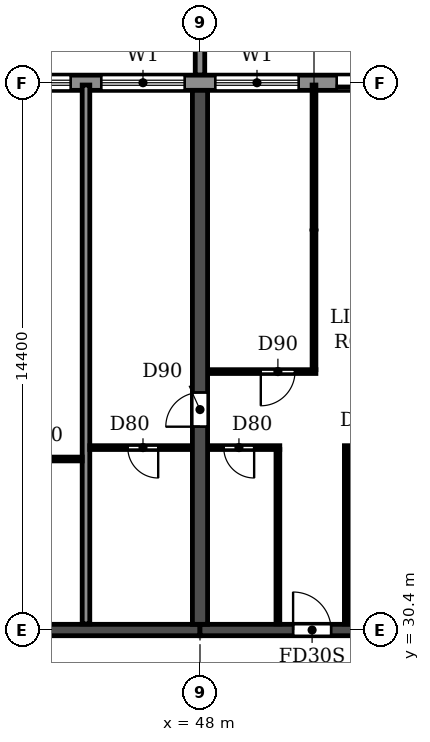
"""IFC4 building model, lengths in metres.
Left out: names, types, materials, properties, quantities, classifications, styles, units other than length and angle.
Written with IfcOpenShell. Run it as: python <this file> out.ifc"""

import sys

from ifc_helpers import new_model, si_unit, direction, frame, frame_2d, origin, place, context, subcontext, project, spatial, polyline, rectangle, outline, extrude, source, transform, mapped, element, fill, save


model = new_model("IFC4")
c1 = context("Model", 3, precision=1e-05, world=origin(), true_north=direction((0.0, 1.0)))
c2 = subcontext(c1, "Body", "Model", "MODEL_VIEW")
j1 = project(units=[si_unit("LENGTHUNIT", "METRE"), si_unit("PLANEANGLEUNIT", "RADIAN")], contexts=[c1])
p1 = place(None, origin())
s1 = spatial("IfcSite", under=j1, at=p1, CompositionType="ELEMENT")
p2 = place(p1, origin())
s2 = spatial("IfcBuilding", under=s1, at=p2, CompositionType="ELEMENT")
p3 = place(p2, frame((0.0, 0.0, 33.3)))
s3 = spatial("IfcBuildingStorey", under=s2, at=p3, CompositionType="ELEMENT", Elevation=33.3)
p4 = place(p3, frame((48.0, 30.55, 0.0), z_axis=(0.0, 0.0, 1.0), x_axis=(0.0, 1.0, 0.0)))
e1 = element("IfcWall", 1, at=p4, inside=s3, PredefinedType="SHEAR", context=c2, shape_type="SweptSolid", body=[
    extrude(rectangle(XDim=14.05, YDim=0.4, at=frame_2d((7.025, 0.0))), origin(), (0.0, 0.0, 1.0), 3.05),
])
p5 = place(p4, frame((5.2, 0.0, 0.0)))
e2 = element("IfcOpeningElement", 2, at=p5, cuts=e1, PredefinedType="OPENING", context=c2, shape_type="SweptSolid", body=[
    extrude(rectangle(XDim=0.9, YDim=2.1, at=frame_2d((0.45, 1.05))), frame((0.0, 0.21, 0.0), z_axis=(0.0, -1.0, 0.0), x_axis=(1.0, 0.0, 0.0)), (0.0, 0.0, 1.0), 0.42),
])
p6 = place(p3, frame((42.0, 30.4, 0.0), z_axis=(0.0, 0.0, 1.0), x_axis=(1.0, 0.0, 0.0)))
e3 = element("IfcWall", 3, at=p6, inside=s3, PredefinedType="SHEAR", context=c2, shape_type="SweptSolid", body=[
    extrude(rectangle(XDim=6.0, YDim=0.3, at=frame_2d((3.0, 0.0))), origin(), (0.0, 0.0, 1.0), 2.45),
])
p7 = place(p3, frame((48.0, 30.4, 0.0), z_axis=(0.0, 0.0, 1.0), x_axis=(1.0, 0.0, 0.0)))
e4 = element("IfcWall", 4, at=p7, inside=s3, PredefinedType="SHEAR", context=c2, shape_type="SweptSolid", body=[
    extrude(rectangle(XDim=6.0, YDim=0.3, at=frame_2d((3.0, 0.0))), origin(), (0.0, 0.0, 1.0), 2.45),
])
p8 = place(p7, frame((2.45, 0.0, 0.0)))
e5 = element("IfcOpeningElement", 5, at=p8, cuts=e4, PredefinedType="OPENING", context=c2, shape_type="SweptSolid", body=[
    extrude(rectangle(XDim=1.0, YDim=2.1, at=frame_2d((0.5, 1.05))), frame((0.0, 0.16, 0.0), z_axis=(0.0, -1.0, 0.0), x_axis=(1.0, 0.0, 0.0)), (0.0, 0.0, 1.0), 0.32),
])
p9 = place(p3, frame((97.317, 44.8, 0.0), z_axis=(0.0, 0.0, 1.0), x_axis=(-1.0, 0.0, 0.0)))
e6 = element("IfcWall", 6, at=p9, inside=s3, PredefinedType="STANDARD", context=c2, shape_type="SweptSolid", body=[
    extrude(rectangle(XDim=92.634, YDim=0.4, at=frame_2d((46.317, 0.0))), origin(), (0.0, 0.0, 1.0), 3.05),
])
p10 = place(p9, frame((88.717, 0.0, 0.9)))
e7 = element("IfcOpeningElement", 7, at=p10, cuts=e6, PredefinedType="OPENING", context=c2, shape_type="SweptSolid", body=[
    extrude(rectangle(XDim=2.2, YDim=1.5, at=frame_2d((1.1, 0.75))), frame((0.0, 0.21, 0.0), z_axis=(0.0, -1.0, 0.0), x_axis=(1.0, 0.0, 0.0)), (0.0, 0.0, 1.0), 0.42),
])
p11 = place(p9, frame((85.917, 0.0, 0.0)))
e8 = element("IfcOpeningElement", 8, at=p11, cuts=e6, PredefinedType="OPENING", context=c2, shape_type="SweptSolid", body=[
    extrude(rectangle(XDim=1.8, YDim=2.4, at=frame_2d((0.9, 1.2))), frame((0.0, 0.21, 0.0), z_axis=(0.0, -1.0, 0.0), x_axis=(1.0, 0.0, 0.0)), (0.0, 0.0, 1.0), 0.42),
])
p12 = place(p9, frame((82.717, 0.0, 0.9)))
e9 = element("IfcOpeningElement", 9, at=p12, cuts=e6, PredefinedType="OPENING", context=c2, shape_type="SweptSolid", body=[
    extrude(rectangle(XDim=2.2, YDim=1.5, at=frame_2d((1.1, 0.75))), frame((0.0, 0.21, 0.0), z_axis=(0.0, -1.0, 0.0), x_axis=(1.0, 0.0, 0.0)), (0.0, 0.0, 1.0), 0.42),
])
p13 = place(p9, frame((79.917, 0.0, 0.0)))
e10 = element("IfcOpeningElement", 10, at=p13, cuts=e6, PredefinedType="OPENING", context=c2, shape_type="SweptSolid", body=[
    extrude(rectangle(XDim=1.8, YDim=2.4, at=frame_2d((0.9, 1.2))), frame((0.0, 0.21, 0.0), z_axis=(0.0, -1.0, 0.0), x_axis=(1.0, 0.0, 0.0)), (0.0, 0.0, 1.0), 0.42),
])
p14 = place(p9, frame((76.717, 0.0, 0.9)))
e11 = element("IfcOpeningElement", 11, at=p14, cuts=e6, PredefinedType="OPENING", context=c2, shape_type="SweptSolid", body=[
    extrude(rectangle(XDim=2.2, YDim=1.5, at=frame_2d((1.1, 0.75))), frame((0.0, 0.21, 0.0), z_axis=(0.0, -1.0, 0.0), x_axis=(1.0, 0.0, 0.0)), (0.0, 0.0, 1.0), 0.42),
])
p15 = place(p9, frame((73.717, 0.0, 0.9)))
e12 = element("IfcOpeningElement", 12, at=p15, cuts=e6, PredefinedType="OPENING", context=c2, shape_type="SweptSolid", body=[
    extrude(rectangle(XDim=2.2, YDim=1.5, at=frame_2d((1.1, 0.75))), frame((0.0, 0.21, 0.0), z_axis=(0.0, -1.0, 0.0), x_axis=(1.0, 0.0, 0.0)), (0.0, 0.0, 1.0), 0.42),
])
p16 = place(p9, frame((70.717, 0.0, 0.9)))
e13 = element("IfcOpeningElement", 13, at=p16, cuts=e6, PredefinedType="OPENING", context=c2, shape_type="SweptSolid", body=[
    extrude(rectangle(XDim=2.2, YDim=1.5, at=frame_2d((1.1, 0.75))), frame((0.0, 0.21, 0.0), z_axis=(0.0, -1.0, 0.0), x_axis=(1.0, 0.0, 0.0)), (0.0, 0.0, 1.0), 0.42),
])
p17 = place(p9, frame((67.917, 0.0, 0.0)))
e14 = element("IfcOpeningElement", 14, at=p17, cuts=e6, PredefinedType="OPENING", context=c2, shape_type="SweptSolid", body=[
    extrude(rectangle(XDim=1.8, YDim=2.4, at=frame_2d((0.9, 1.2))), frame((0.0, 0.21, 0.0), z_axis=(0.0, -1.0, 0.0), x_axis=(1.0, 0.0, 0.0)), (0.0, 0.0, 1.0), 0.42),
])
p18 = place(p9, frame((64.717, 0.0, 0.9)))
e15 = element("IfcOpeningElement", 15, at=p18, cuts=e6, PredefinedType="OPENING", context=c2, shape_type="SweptSolid", body=[
    extrude(rectangle(XDim=2.2, YDim=1.5, at=frame_2d((1.1, 0.75))), frame((0.0, 0.21, 0.0), z_axis=(0.0, -1.0, 0.0), x_axis=(1.0, 0.0, 0.0)), (0.0, 0.0, 1.0), 0.42),
])
p19 = place(p9, frame((61.717, 0.0, 0.9)))
e16 = element("IfcOpeningElement", 16, at=p19, cuts=e6, PredefinedType="OPENING", context=c2, shape_type="SweptSolid", body=[
    extrude(rectangle(XDim=2.2, YDim=1.5, at=frame_2d((1.1, 0.75))), frame((0.0, 0.21, 0.0), z_axis=(0.0, -1.0, 0.0), x_axis=(1.0, 0.0, 0.0)), (0.0, 0.0, 1.0), 0.42),
])
p20 = place(p9, frame((58.717, 0.0, 0.9)))
e17 = element("IfcOpeningElement", 17, at=p20, cuts=e6, PredefinedType="OPENING", context=c2, shape_type="SweptSolid", body=[
    extrude(rectangle(XDim=2.2, YDim=1.5, at=frame_2d((1.1, 0.75))), frame((0.0, 0.21, 0.0), z_axis=(0.0, -1.0, 0.0), x_axis=(1.0, 0.0, 0.0)), (0.0, 0.0, 1.0), 0.42),
])
p21 = place(p9, frame((55.917, 0.0, 0.0)))
e18 = element("IfcOpeningElement", 18, at=p21, cuts=e6, PredefinedType="OPENING", context=c2, shape_type="SweptSolid", body=[
    extrude(rectangle(XDim=1.8, YDim=2.4, at=frame_2d((0.9, 1.2))), frame((0.0, 0.21, 0.0), z_axis=(0.0, -1.0, 0.0), x_axis=(1.0, 0.0, 0.0)), (0.0, 0.0, 1.0), 0.42),
])
p22 = place(p9, frame((52.717, 0.0, 0.9)))
e19 = element("IfcOpeningElement", 19, at=p22, cuts=e6, PredefinedType="OPENING", context=c2, shape_type="SweptSolid", body=[
    extrude(rectangle(XDim=2.2, YDim=1.5, at=frame_2d((1.1, 0.75))), frame((0.0, 0.21, 0.0), z_axis=(0.0, -1.0, 0.0), x_axis=(1.0, 0.0, 0.0)), (0.0, 0.0, 1.0), 0.42),
])
p23 = place(p9, frame((49.717, 0.0, 0.9)))
e20 = element("IfcOpeningElement", 20, at=p23, cuts=e6, PredefinedType="OPENING", context=c2, shape_type="SweptSolid", body=[
    extrude(rectangle(XDim=2.2, YDim=1.5, at=frame_2d((1.1, 0.75))), frame((0.0, 0.21, 0.0), z_axis=(0.0, -1.0, 0.0), x_axis=(1.0, 0.0, 0.0)), (0.0, 0.0, 1.0), 0.42),
])
p24 = place(p9, frame((46.717, 0.0, 0.9)))
e21 = element("IfcOpeningElement", 21, at=p24, cuts=e6, PredefinedType="OPENING", context=c2, shape_type="SweptSolid", body=[
    extrude(rectangle(XDim=2.2, YDim=1.5, at=frame_2d((1.1, 0.75))), frame((0.0, 0.21, 0.0), z_axis=(0.0, -1.0, 0.0), x_axis=(1.0, 0.0, 0.0)), (0.0, 0.0, 1.0), 0.42),
])
p25 = place(p9, frame((43.917, 0.0, 0.0)))
e22 = element("IfcOpeningElement", 22, at=p25, cuts=e6, PredefinedType="OPENING", context=c2, shape_type="SweptSolid", body=[
    extrude(rectangle(XDim=1.8, YDim=2.4, at=frame_2d((0.9, 1.2))), frame((0.0, 0.21, 0.0), z_axis=(0.0, -1.0, 0.0), x_axis=(1.0, 0.0, 0.0)), (0.0, 0.0, 1.0), 0.42),
])
p26 = place(p9, frame((40.717, 0.0, 0.9)))
e23 = element("IfcOpeningElement", 23, at=p26, cuts=e6, PredefinedType="OPENING", context=c2, shape_type="SweptSolid", body=[
    extrude(rectangle(XDim=2.2, YDim=1.5, at=frame_2d((1.1, 0.75))), frame((0.0, 0.21, 0.0), z_axis=(0.0, -1.0, 0.0), x_axis=(1.0, 0.0, 0.0)), (0.0, 0.0, 1.0), 0.42),
])
p27 = place(p9, frame((37.717, 0.0, 0.9)))
e24 = element("IfcOpeningElement", 24, at=p27, cuts=e6, PredefinedType="OPENING", context=c2, shape_type="SweptSolid", body=[
    extrude(rectangle(XDim=2.2, YDim=1.5, at=frame_2d((1.1, 0.75))), frame((0.0, 0.21, 0.0), z_axis=(0.0, -1.0, 0.0), x_axis=(1.0, 0.0, 0.0)), (0.0, 0.0, 1.0), 0.42),
])
p28 = place(p9, frame((34.717, 0.0, 0.9)))
e25 = element("IfcOpeningElement", 25, at=p28, cuts=e6, PredefinedType="OPENING", context=c2, shape_type="SweptSolid", body=[
    extrude(rectangle(XDim=2.2, YDim=1.5, at=frame_2d((1.1, 0.75))), frame((0.0, 0.21, 0.0), z_axis=(0.0, -1.0, 0.0), x_axis=(1.0, 0.0, 0.0)), (0.0, 0.0, 1.0), 0.42),
])
p29 = place(p9, frame((31.917, 0.0, 0.0)))
e26 = element("IfcOpeningElement", 26, at=p29, cuts=e6, PredefinedType="OPENING", context=c2, shape_type="SweptSolid", body=[
    extrude(rectangle(XDim=1.8, YDim=2.4, at=frame_2d((0.9, 1.2))), frame((0.0, 0.21, 0.0), z_axis=(0.0, -1.0, 0.0), x_axis=(1.0, 0.0, 0.0)), (0.0, 0.0, 1.0), 0.42),
])
p30 = place(p9, frame((28.717, 0.0, 0.9)))
e27 = element("IfcOpeningElement", 27, at=p30, cuts=e6, PredefinedType="OPENING", context=c2, shape_type="SweptSolid", body=[
    extrude(rectangle(XDim=2.2, YDim=1.5, at=frame_2d((1.1, 0.75))), frame((0.0, 0.21, 0.0), z_axis=(0.0, -1.0, 0.0), x_axis=(1.0, 0.0, 0.0)), (0.0, 0.0, 1.0), 0.42),
])
p31 = place(p9, frame((25.717, 0.0, 0.9)))
e28 = element("IfcOpeningElement", 28, at=p31, cuts=e6, PredefinedType="OPENING", context=c2, shape_type="SweptSolid", body=[
    extrude(rectangle(XDim=2.2, YDim=1.5, at=frame_2d((1.1, 0.75))), frame((0.0, 0.21, 0.0), z_axis=(0.0, -1.0, 0.0), x_axis=(1.0, 0.0, 0.0)), (0.0, 0.0, 1.0), 0.42),
])
p32 = place(p9, frame((22.917, 0.0, 0.0)))
e29 = element("IfcOpeningElement", 29, at=p32, cuts=e6, PredefinedType="OPENING", context=c2, shape_type="SweptSolid", body=[
    extrude(rectangle(XDim=1.8, YDim=2.4, at=frame_2d((0.9, 1.2))), frame((0.0, 0.21, 0.0), z_axis=(0.0, -1.0, 0.0), x_axis=(1.0, 0.0, 0.0)), (0.0, 0.0, 1.0), 0.42),
])
p33 = place(p9, frame((19.717, 0.0, 0.9)))
e30 = element("IfcOpeningElement", 30, at=p33, cuts=e6, PredefinedType="OPENING", context=c2, shape_type="SweptSolid", body=[
    extrude(rectangle(XDim=2.2, YDim=1.5, at=frame_2d((1.1, 0.75))), frame((0.0, 0.21, 0.0), z_axis=(0.0, -1.0, 0.0), x_axis=(1.0, 0.0, 0.0)), (0.0, 0.0, 1.0), 0.42),
])
p34 = place(p9, frame((16.717, 0.0, 0.9)))
e31 = element("IfcOpeningElement", 31, at=p34, cuts=e6, PredefinedType="OPENING", context=c2, shape_type="SweptSolid", body=[
    extrude(rectangle(XDim=2.2, YDim=1.5, at=frame_2d((1.1, 0.75))), frame((0.0, 0.21, 0.0), z_axis=(0.0, -1.0, 0.0), x_axis=(1.0, 0.0, 0.0)), (0.0, 0.0, 1.0), 0.42),
])
p35 = place(p9, frame((13.917, 0.0, 0.0)))
e32 = element("IfcOpeningElement", 32, at=p35, cuts=e6, PredefinedType="OPENING", context=c2, shape_type="SweptSolid", body=[
    extrude(rectangle(XDim=1.8, YDim=2.4, at=frame_2d((0.9, 1.2))), frame((0.0, 0.21, 0.0), z_axis=(0.0, -1.0, 0.0), x_axis=(1.0, 0.0, 0.0)), (0.0, 0.0, 1.0), 0.42),
])
p36 = place(p9, frame((10.717, 0.0, 0.9)))
e33 = element("IfcOpeningElement", 33, at=p36, cuts=e6, PredefinedType="OPENING", context=c2, shape_type="SweptSolid", body=[
    extrude(rectangle(XDim=2.2, YDim=1.5, at=frame_2d((1.1, 0.75))), frame((0.0, 0.21, 0.0), z_axis=(0.0, -1.0, 0.0), x_axis=(1.0, 0.0, 0.0)), (0.0, 0.0, 1.0), 0.42),
])
p37 = place(p9, frame((7.917, 0.0, 0.0)))
e34 = element("IfcOpeningElement", 34, at=p37, cuts=e6, PredefinedType="OPENING", context=c2, shape_type="SweptSolid", body=[
    extrude(rectangle(XDim=1.8, YDim=2.4, at=frame_2d((0.9, 1.2))), frame((0.0, 0.21, 0.0), z_axis=(0.0, -1.0, 0.0), x_axis=(1.0, 0.0, 0.0)), (0.0, 0.0, 1.0), 0.42),
])
p38 = place(p9, frame((4.717, 0.0, 0.9)))
e35 = element("IfcOpeningElement", 35, at=p38, cuts=e6, PredefinedType="OPENING", context=c2, shape_type="SweptSolid", body=[
    extrude(rectangle(XDim=2.2, YDim=1.5, at=frame_2d((1.1, 0.75))), frame((0.0, 0.21, 0.0), z_axis=(0.0, -1.0, 0.0), x_axis=(1.0, 0.0, 0.0)), (0.0, 0.0, 1.0), 0.42),
])
p39 = place(p9, frame((1.917, 0.0, 0.0)))
e36 = element("IfcOpeningElement", 36, at=p39, cuts=e6, PredefinedType="OPENING", context=c2, shape_type="SweptSolid", body=[
    extrude(rectangle(XDim=1.8, YDim=2.4, at=frame_2d((0.9, 1.2))), frame((0.0, 0.21, 0.0), z_axis=(0.0, -1.0, 0.0), x_axis=(1.0, 0.0, 0.0)), (0.0, 0.0, 1.0), 0.42),
])
m1 = source(origin(), c2, "Body", "SweptSolid", [
    extrude(outline(polyline([(0.0, 0.0), (0.25, 0.0), (0.25, 3.1), (0.0, 3.1), (0.0, 0.0)])), origin(), (0.0, 0.0, 1.0), 3.1),
])
p40 = place(p3, frame((47.875, 45.0, 0.0)))
e37 = element("IfcWall", 37, at=p40, inside=s3, PredefinedType="STANDARD", context=c2, shape_type="MappedRepresentation", body=[
    mapped(m1, transform((0.0, 0.0, 0.0))),
])
p41 = place(p3, frame((45.0, 30.56, 0.0), z_axis=(0.0, 0.0, 1.0), x_axis=(0.0, 1.0, 0.0)))
e38 = element("IfcWall", 38, at=p41, inside=s3, PredefinedType="PARTITIONING", context=c2, shape_type="SweptSolid", body=[
    extrude(rectangle(XDim=14.18, YDim=0.2, at=frame_2d((7.09, 0.0))), origin(), (0.0, 0.0, 1.0), 3.05),
])
p42 = place(p3, frame((42.21, 34.9, 0.0), z_axis=(0.0, 0.0, 1.0), x_axis=(1.0, 0.0, 0.0)))
e39 = element("IfcWall", 39, at=p42, inside=s3, PredefinedType="PARTITIONING", context=c2, shape_type="SweptSolid", body=[
    extrude(rectangle(XDim=2.69, YDim=0.1, at=frame_2d((1.345, 0.0))), origin(), (0.0, 0.0, 1.0), 3.05),
])
p43 = place(p42, frame((0.89, 0.0, 0.0)))
e40 = element("IfcOpeningElement", 40, at=p43, cuts=e39, PredefinedType="OPENING", context=c2, shape_type="SweptSolid", body=[
    extrude(rectangle(XDim=0.8, YDim=2.1, at=frame_2d((0.4, 1.05))), frame((0.0, 0.06, 0.0), z_axis=(0.0, -1.0, 0.0), x_axis=(1.0, 0.0, 0.0)), (0.0, 0.0, 1.0), 0.12),
])
p44 = place(p3, frame((45.1, 35.2, 0.0), z_axis=(0.0, 0.0, 1.0), x_axis=(1.0, 0.0, 0.0)))
e41 = element("IfcWall", 41, at=p44, inside=s3, PredefinedType="PARTITIONING", context=c2, shape_type="SweptSolid", body=[
    extrude(rectangle(XDim=2.69, YDim=0.1, at=frame_2d((1.345, 0.0))), origin(), (0.0, 0.0, 1.0), 3.05),
])
p45 = place(p44, frame((1.0, 0.0, 0.0)))
e42 = element("IfcOpeningElement", 42, at=p45, cuts=e41, PredefinedType="OPENING", context=c2, shape_type="SweptSolid", body=[
    extrude(rectangle(XDim=0.8, YDim=2.1, at=frame_2d((0.4, 1.05))), frame((0.0, 0.06, 0.0), z_axis=(0.0, -1.0, 0.0), x_axis=(1.0, 0.0, 0.0)), (0.0, 0.0, 1.0), 0.12),
])
p46 = place(p3, frame((48.21, 35.2, 0.0), z_axis=(0.0, 0.0, 1.0), x_axis=(1.0, 0.0, 0.0)))
e43 = element("IfcWall", 43, at=p46, inside=s3, PredefinedType="PARTITIONING", context=c2, shape_type="SweptSolid", body=[
    extrude(rectangle(XDim=1.89, YDim=0.1, at=frame_2d((0.945, 0.0))), origin(), (0.0, 0.0, 1.0), 3.05),
])
p47 = place(p46, frame((0.415, 0.0, 0.0)))
e44 = element("IfcOpeningElement", 44, at=p47, cuts=e43, PredefinedType="OPENING", context=c2, shape_type="SweptSolid", body=[
    extrude(rectangle(XDim=0.8, YDim=2.1, at=frame_2d((0.4, 1.05))), frame((0.0, 0.06, 0.0), z_axis=(0.0, -1.0, 0.0), x_axis=(1.0, 0.0, 0.0)), (0.0, 0.0, 1.0), 0.12),
])
p48 = place(p3, frame((51.8, 35.2, 0.0), z_axis=(0.0, 0.0, 1.0), x_axis=(1.0, 0.0, 0.0)))
e45 = element("IfcWall", 45, at=p48, inside=s3, PredefinedType="PARTITIONING", context=c2, shape_type="SweptSolid", body=[
    extrude(rectangle(XDim=1.99, YDim=0.1, at=frame_2d((0.995, 0.0))), origin(), (0.0, 0.0, 1.0), 3.05),
])
p49 = place(p48, frame((0.675, 0.0, 0.0)))
e46 = element("IfcOpeningElement", 46, at=p49, cuts=e45, PredefinedType="OPENING", context=c2, shape_type="SweptSolid", body=[
    extrude(rectangle(XDim=0.9, YDim=2.1, at=frame_2d((0.45, 1.05))), frame((0.0, 0.06, 0.0), z_axis=(0.0, -1.0, 0.0), x_axis=(1.0, 0.0, 0.0)), (0.0, 0.0, 1.0), 0.12),
])
p50 = place(p3, frame((48.21, 37.2, 0.0), z_axis=(0.0, 0.0, 1.0), x_axis=(1.0, 0.0, 0.0)))
e47 = element("IfcWall", 47, at=p50, inside=s3, PredefinedType="PARTITIONING", context=c2, shape_type="SweptSolid", body=[
    extrude(rectangle(XDim=2.84, YDim=0.1, at=frame_2d((1.42, 0.0))), origin(), (0.0, 0.0, 1.0), 3.05),
])
p51 = place(p50, frame((1.39, 0.0, 0.0)))
e48 = element("IfcOpeningElement", 48, at=p51, cuts=e47, PredefinedType="OPENING", context=c2, shape_type="SweptSolid", body=[
    extrude(rectangle(XDim=0.9, YDim=2.1, at=frame_2d((0.45, 1.05))), frame((0.0, 0.06, 0.0), z_axis=(0.0, -1.0, 0.0), x_axis=(1.0, 0.0, 0.0)), (0.0, 0.0, 1.0), 0.12),
])
p52 = place(p3, frame((50.05, 30.56, 0.0), z_axis=(0.0, 0.0, 1.0), x_axis=(0.0, 1.0, 0.0)))
e49 = element("IfcWall", 49, at=p52, inside=s3, PredefinedType="PARTITIONING", context=c2, shape_type="SweptSolid", body=[
    extrude(rectangle(XDim=4.59, YDim=0.1, at=frame_2d((2.295, 0.0))), origin(), (0.0, 0.0, 1.0), 3.05),
])
p53 = place(p3, frame((51.0, 37.25, 0.0), z_axis=(0.0, 0.0, 1.0), x_axis=(0.0, 1.0, 0.0)))
e50 = element("IfcWall", 50, at=p53, inside=s3, PredefinedType="PARTITIONING", context=c2, shape_type="SweptSolid", body=[
    extrude(rectangle(XDim=7.49, YDim=0.1, at=frame_2d((3.745, 0.0))), origin(), (0.0, 0.0, 1.0), 3.05),
])
p54 = place(p3, frame((51.85, 30.56, 0.0), z_axis=(0.0, 0.0, 1.0), x_axis=(0.0, 1.0, 0.0)))
e51 = element("IfcWall", 51, at=p54, inside=s3, PredefinedType="PARTITIONING", context=c2, shape_type="SweptSolid", body=[
    extrude(rectangle(XDim=4.59, YDim=0.1, at=frame_2d((2.295, 0.0))), origin(), (0.0, 0.0, 1.0), 3.05),
])
p55 = place(p22, origin())
e52 = element("IfcWindow", 52, at=p55, inside=s3, PartitioningType="DOUBLE_PANEL_HORIZONTAL", PredefinedType="WINDOW", context=c2, shape_type="SweptSolid", body=[
    extrude(rectangle(XDim=2.2, YDim=1.5, at=frame_2d((1.1, 0.75))), frame((0.0, 0.03, 0.0), z_axis=(0.0, -1.0, 0.0), x_axis=(1.0, 0.0, 0.0)), (0.0, 0.0, 1.0), 0.06),
])
fill(e19, e52)
p56 = place(p23, origin())
e53 = element("IfcWindow", 53, at=p56, inside=s3, PartitioningType="DOUBLE_PANEL_HORIZONTAL", PredefinedType="WINDOW", context=c2, shape_type="SweptSolid", body=[
    extrude(rectangle(XDim=2.2, YDim=1.5, at=frame_2d((1.1, 0.75))), frame((0.0, 0.03, 0.0), z_axis=(0.0, -1.0, 0.0), x_axis=(1.0, 0.0, 0.0)), (0.0, 0.0, 1.0), 0.06),
])
fill(e20, e53)
p57 = place(p24, origin())
e54 = element("IfcWindow", 54, at=p57, inside=s3, PartitioningType="DOUBLE_PANEL_HORIZONTAL", PredefinedType="WINDOW", context=c2, shape_type="SweptSolid", body=[
    extrude(rectangle(XDim=2.2, YDim=1.5, at=frame_2d((1.1, 0.75))), frame((0.0, 0.03, 0.0), z_axis=(0.0, -1.0, 0.0), x_axis=(1.0, 0.0, 0.0)), (0.0, 0.0, 1.0), 0.06),
])
fill(e21, e54)
p58 = place(p25, origin())
e55 = element("IfcDoor", 55, at=p58, inside=s3, OperationType="DOUBLE_DOOR_SLIDING", PredefinedType="DOOR", context=c2, shape_type="SweptSolid", body=[
    extrude(rectangle(XDim=1.8, YDim=2.4, at=frame_2d((0.9, 1.2))), frame((0.0, 0.025, 0.0), z_axis=(0.0, -1.0, 0.0), x_axis=(1.0, 0.0, 0.0)), (0.0, 0.0, 1.0), 0.05),
])
fill(e22, e55)
p59 = place(p45, frame((0.8, 0.0, 0.0), z_axis=(0.0, 0.0, 1.0), x_axis=(-1.0, 0.0, 0.0)))
e56 = element("IfcDoor", 56, at=p59, inside=s3, OperationType="SINGLE_SWING_LEFT", PredefinedType="DOOR", context=c2, shape_type="SweptSolid", body=[
    extrude(rectangle(XDim=0.8, YDim=2.1, at=frame_2d((0.4, 1.05))), frame((0.0, 0.025, 0.0), z_axis=(0.0, -1.0, 0.0), x_axis=(1.0, 0.0, 0.0)), (0.0, 0.0, 1.0), 0.05),
])
fill(e42, e56)
p60 = place(p5, origin())
e57 = element("IfcDoor", 57, at=p60, inside=s3, OperationType="SINGLE_SWING_LEFT", PredefinedType="DOOR", context=c2, shape_type="SweptSolid", body=[
    extrude(rectangle(XDim=0.9, YDim=2.1, at=frame_2d((0.45, 1.05))), frame((0.0, 0.025, 0.0), z_axis=(0.0, -1.0, 0.0), x_axis=(1.0, 0.0, 0.0)), (0.0, 0.0, 1.0), 0.05),
])
fill(e2, e57)
p61 = place(p47, frame((0.8, 0.0, 0.0), z_axis=(0.0, 0.0, 1.0), x_axis=(-1.0, 0.0, 0.0)))
e58 = element("IfcDoor", 58, at=p61, inside=s3, OperationType="SINGLE_SWING_LEFT", PredefinedType="DOOR", context=c2, shape_type="SweptSolid", body=[
    extrude(rectangle(XDim=0.8, YDim=2.1, at=frame_2d((0.4, 1.05))), frame((0.0, 0.025, 0.0), z_axis=(0.0, -1.0, 0.0), x_axis=(1.0, 0.0, 0.0)), (0.0, 0.0, 1.0), 0.05),
])
fill(e44, e58)
p62 = place(p51, frame((0.9, 0.0, 0.0), z_axis=(0.0, 0.0, 1.0), x_axis=(-1.0, 0.0, 0.0)))
e59 = element("IfcDoor", 59, at=p62, inside=s3, OperationType="SINGLE_SWING_RIGHT", PredefinedType="DOOR", context=c2, shape_type="SweptSolid", body=[
    extrude(rectangle(XDim=0.9, YDim=2.1, at=frame_2d((0.45, 1.05))), frame((0.0, 0.025, 0.0), z_axis=(0.0, -1.0, 0.0), x_axis=(1.0, 0.0, 0.0)), (0.0, 0.0, 1.0), 0.05),
])
fill(e48, e59)
p63 = place(p8, origin())
e60 = element("IfcDoor", 60, at=p63, inside=s3, OperationType="SINGLE_SWING_LEFT", PredefinedType="DOOR", context=c2, shape_type="SweptSolid", body=[
    extrude(rectangle(XDim=1.0, YDim=2.1, at=frame_2d((0.5, 1.05))), frame((0.0, 0.025, 0.0), z_axis=(0.0, -1.0, 0.0), x_axis=(1.0, 0.0, 0.0)), (0.0, 0.0, 1.0), 0.05),
])
fill(e5, e60)
save(model, sys.argv[1])
